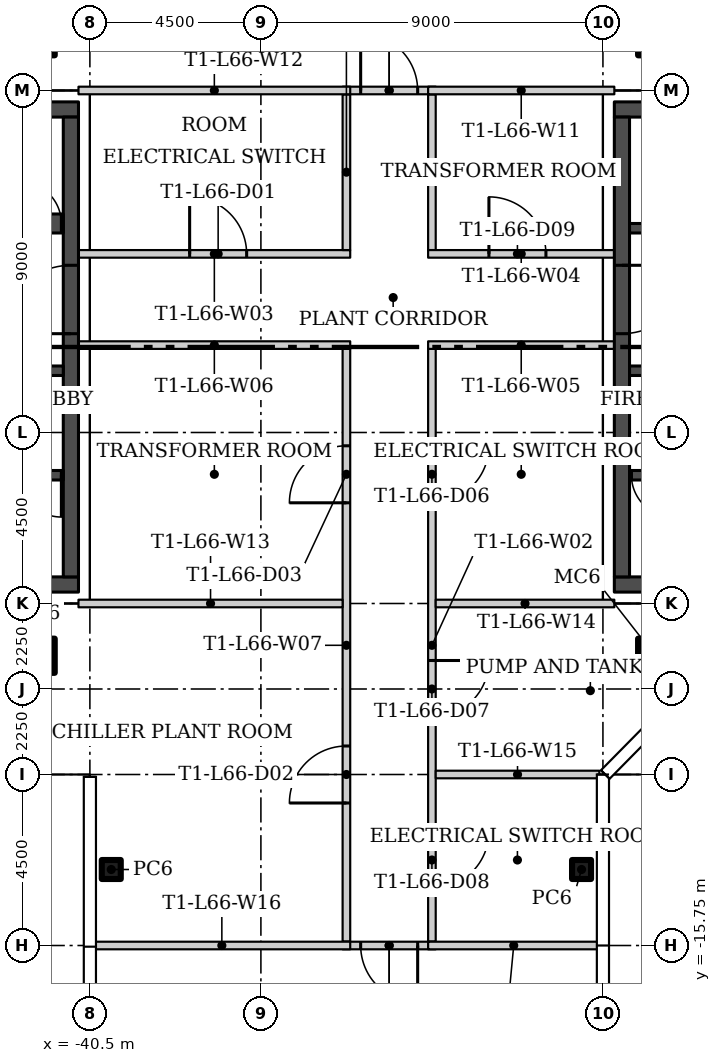
"""IFC4 building model, lengths in metres.
Left out: names, types, materials, properties, quantities, classifications, styles, units other than length and angle.
Written with IfcOpenShell. Run it as: python <this file> out.ifc"""

import sys

from ifc_helpers import new_model, si_unit, direction, frame, frame_2d, origin, origin_2d, place, context, subcontext, project, spatial, rectangle, hollow_rectangle, extrude, element, fill, save


model = new_model("IFC4")
c1 = context("Model", 3, precision=1e-05, world=origin(), true_north=direction((0.0, 1.0)))
c2 = subcontext(c1, "Body", "Model", "MODEL_VIEW")
j1 = project(units=[si_unit("LENGTHUNIT", "METRE"), si_unit("PLANEANGLEUNIT", "RADIAN")], contexts=[c1])
p1 = place(None, origin())
s1 = spatial("IfcSite", under=j1, at=p1, CompositionType="ELEMENT")
p2 = place(p1, origin())
s2 = spatial("IfcBuilding", under=s1, at=p2, CompositionType="ELEMENT")
p3 = place(p2, frame((0.0, 0.0, 273.3)))
s3 = spatial("IfcBuildingStorey", under=s2, at=p3, CompositionType="ELEMENT", Elevation=273.3)
for number, where in (
    (1, (-25.625, 8.125, 0.0)),
    (2, (-25.625, -8.125, 0.0)),
    (3, (-41.875, 8.125, 0.0)),
    (4, (-41.875, -8.125, 0.0)),
):
    element("IfcColumn", number, at=place(p3, frame(where)), inside=s3, PredefinedType="COLUMN", context=c2, shape_type="SweptSolid", body=[
        extrude(hollow_rectangle(XDim=0.9, YDim=0.9, WallThickness=0.036, at=origin_2d()), origin(), (0.0, 0.0, 1.0), 4.55),
    ])
for number, where in (
    (5, (-39.938, -13.75, 0.0)),
    (6, (-27.562, -13.75, 0.0)),
):
    element("IfcColumn", number, at=place(p3, frame(where)), inside=s3, PredefinedType="COLUMN", context=c2, shape_type="SweptSolid", body=[
        extrude(hollow_rectangle(XDim=0.5, YDim=0.5, WallThickness=0.016, at=origin_2d()), origin(), (0.0, 0.0, 1.0), 4.55),
    ])
p4 = place(p3, frame((-31.5, 6.65, 0.0), z_axis=(0.0, 0.0, 1.0), x_axis=(0.0, -1.0, 0.0)))
e7 = element("IfcWall", 7, at=p4, inside=s3, PredefinedType="PARTITIONING", context=c2, shape_type="SweptSolid", body=[
    extrude(rectangle(XDim=4.1, YDim=0.2, at=frame_2d((2.05, 0.0))), origin(), (0.0, 0.0, 1.0), 4.55),
])
p5 = place(p3, frame((-31.5, -0.05, 0.0), z_axis=(0.0, 0.0, 1.0), x_axis=(0.0, -1.0, 0.0)))
e8 = element("IfcWall", 8, at=p5, inside=s3, PredefinedType="PARTITIONING", context=c2, shape_type="SweptSolid", body=[
    extrude(rectangle(XDim=15.6, YDim=0.2, at=frame_2d((7.8, 0.0))), origin(), (0.0, 0.0, 1.0), 4.55),
])
p6 = place(p5, frame((2.55, 0.0, 0.0)))
e9 = element("IfcOpeningElement", 9, at=p6, cuts=e8, PredefinedType="OPENING", context=c2, shape_type="SweptSolid", body=[
    extrude(rectangle(XDim=1.5, YDim=2.4, at=frame_2d((0.75, 1.2))), frame((0.0, 0.11, 0.0), z_axis=(0.0, -1.0, 0.0), x_axis=(1.0, 0.0, 0.0)), (0.0, 0.0, 1.0), 0.22),
])
p7 = place(p5, frame((8.2, 0.0, 0.0)))
e10 = element("IfcOpeningElement", 10, at=p7, cuts=e8, PredefinedType="OPENING", context=c2, shape_type="SweptSolid", body=[
    extrude(rectangle(XDim=1.5, YDim=2.4, at=frame_2d((0.75, 1.2))), frame((0.0, 0.11, 0.0), z_axis=(0.0, -1.0, 0.0), x_axis=(1.0, 0.0, 0.0)), (0.0, 0.0, 1.0), 0.22),
])
p8 = place(p5, frame((12.7, 0.0, 0.0)))
e11 = element("IfcOpeningElement", 11, at=p8, cuts=e8, PredefinedType="OPENING", context=c2, shape_type="SweptSolid", body=[
    extrude(rectangle(XDim=1.5, YDim=2.4, at=frame_2d((0.75, 1.2))), frame((0.0, 0.11, 0.0), z_axis=(0.0, -1.0, 0.0), x_axis=(1.0, 0.0, 0.0)), (0.0, 0.0, 1.0), 0.22),
])
p9 = place(p3, frame((-40.8, 2.45, 0.0)))
e12 = element("IfcWall", 12, at=p9, inside=s3, PredefinedType="PARTITIONING", context=c2, shape_type="SweptSolid", body=[
    extrude(rectangle(XDim=7.15, YDim=0.2, at=frame_2d((3.575, 0.0))), origin(), (0.0, 0.0, 1.0), 4.55),
])
p10 = place(p9, frame((2.925, 0.0, 0.0)))
e13 = element("IfcOpeningElement", 13, at=p10, cuts=e12, PredefinedType="OPENING", context=c2, shape_type="SweptSolid", body=[
    extrude(rectangle(XDim=1.5, YDim=2.4, at=frame_2d((0.75, 1.2))), frame((0.0, 0.11, 0.0), z_axis=(0.0, -1.0, 0.0), x_axis=(1.0, 0.0, 0.0)), (0.0, 0.0, 1.0), 0.22),
])
p11 = place(p3, frame((-31.6, 2.45, 0.0)))
e14 = element("IfcWall", 14, at=p11, inside=s3, PredefinedType="PARTITIONING", context=c2, shape_type="SweptSolid", body=[
    extrude(rectangle(XDim=4.9, YDim=0.2, at=frame_2d((2.45, 0.0))), origin(), (0.0, 0.0, 1.0), 4.55),
])
p12 = place(p11, frame((1.6, 0.0, 0.0)))
e15 = element("IfcOpeningElement", 15, at=p12, cuts=e14, PredefinedType="OPENING", context=c2, shape_type="SweptSolid", body=[
    extrude(rectangle(XDim=1.5, YDim=2.4, at=frame_2d((0.75, 1.2))), frame((0.0, 0.11, 0.0), z_axis=(0.0, -1.0, 0.0), x_axis=(1.0, 0.0, 0.0)), (0.0, 0.0, 1.0), 0.22),
])
p13 = place(p3, frame((-26.7, 0.05, 0.0), z_axis=(0.0, 0.0, 1.0), x_axis=(-1.0, 0.0, 0.0)))
e16 = element("IfcWall", 16, at=p13, inside=s3, PredefinedType="PARTITIONING", context=c2, shape_type="SweptSolid", body=[
    extrude(rectangle(XDim=4.9, YDim=0.2, at=frame_2d((2.45, 0.0))), origin(), (0.0, 0.0, 1.0), 4.55),
])
p14 = place(p3, frame((-33.65, 0.05, 0.0), z_axis=(0.0, 0.0, 1.0), x_axis=(-1.0, 0.0, 0.0)))
e17 = element("IfcWall", 17, at=p14, inside=s3, PredefinedType="PARTITIONING", context=c2, shape_type="SweptSolid", body=[
    extrude(rectangle(XDim=7.15, YDim=0.2, at=frame_2d((3.575, 0.0))), origin(), (0.0, 0.0, 1.0), 4.55),
])
p15 = place(p3, frame((-33.75, -15.65, 0.0), z_axis=(0.0, 0.0, 1.0), x_axis=(0.0, 1.0, 0.0)))
e18 = element("IfcWall", 18, at=p15, inside=s3, PredefinedType="PARTITIONING", context=c2, shape_type="SweptSolid", body=[
    extrude(rectangle(XDim=15.6, YDim=0.2, at=frame_2d((7.8, 0.0))), origin(), (0.0, 0.0, 1.0), 4.55),
])
p16 = place(p15, frame((3.65, 0.0, 0.0)))
e19 = element("IfcOpeningElement", 19, at=p16, cuts=e18, PredefinedType="OPENING", context=c2, shape_type="SweptSolid", body=[
    extrude(rectangle(XDim=1.5, YDim=2.4, at=frame_2d((0.75, 1.2))), frame((0.0, 0.11, 0.0), z_axis=(0.0, -1.0, 0.0), x_axis=(1.0, 0.0, 0.0)), (0.0, 0.0, 1.0), 0.22),
])
p17 = place(p15, frame((11.55, 0.0, 0.0)))
e20 = element("IfcOpeningElement", 20, at=p17, cuts=e18, PredefinedType="OPENING", context=c2, shape_type="SweptSolid", body=[
    extrude(rectangle(XDim=1.5, YDim=2.4, at=frame_2d((0.75, 1.2))), frame((0.0, 0.11, 0.0), z_axis=(0.0, -1.0, 0.0), x_axis=(1.0, 0.0, 0.0)), (0.0, 0.0, 1.0), 0.22),
])
p18 = place(p3, frame((-33.75, 2.55, 0.0), z_axis=(0.0, 0.0, 1.0), x_axis=(0.0, 1.0, 0.0)))
e21 = element("IfcWall", 21, at=p18, inside=s3, PredefinedType="PARTITIONING", context=c2, shape_type="SweptSolid", body=[
    extrude(rectangle(XDim=4.1, YDim=0.2, at=frame_2d((2.05, 0.0))), origin(), (0.0, 0.0, 1.0), 4.55),
])
p19 = place(p3, frame((-33.85, 6.75, 0.0)))
e22 = element("IfcWall", 22, at=p19, inside=s3, PredefinedType="PARTITIONING", context=c2, shape_type="SweptSolid", body=[
    extrude(rectangle(XDim=2.45, YDim=0.2, at=frame_2d((1.225, 0.0))), origin(), (0.0, 0.0, 1.0), 4.55),
])
p20 = place(p19, frame((0.475, 0.0, 0.0)))
e23 = element("IfcOpeningElement", 23, at=p20, cuts=e22, PredefinedType="OPENING", context=c2, shape_type="SweptSolid", body=[
    extrude(rectangle(XDim=1.5, YDim=2.4, at=frame_2d((0.75, 1.2))), frame((0.0, 0.11, 0.0), z_axis=(0.0, -1.0, 0.0), x_axis=(1.0, 0.0, 0.0)), (0.0, 0.0, 1.0), 0.22),
])
p21 = place(p3, frame((-31.4, -15.75, 0.0), z_axis=(0.0, 0.0, 1.0), x_axis=(-1.0, 0.0, 0.0)))
e24 = element("IfcWall", 24, at=p21, inside=s3, PredefinedType="PARTITIONING", context=c2, shape_type="SweptSolid", body=[
    extrude(rectangle(XDim=2.45, YDim=0.2, at=frame_2d((1.225, 0.0))), origin(), (0.0, 0.0, 1.0), 4.55),
])
p22 = place(p21, frame((0.475, 0.0, 0.0)))
e25 = element("IfcOpeningElement", 25, at=p22, cuts=e24, PredefinedType="OPENING", context=c2, shape_type="SweptSolid", body=[
    extrude(rectangle(XDim=1.5, YDim=2.4, at=frame_2d((0.75, 1.2))), frame((0.0, 0.11, 0.0), z_axis=(0.0, -1.0, 0.0), x_axis=(1.0, 0.0, 0.0)), (0.0, 0.0, 1.0), 0.22),
])
p23 = place(p3, frame((-26.7, 6.75, 0.0), z_axis=(0.0, 0.0, 1.0), x_axis=(-1.0, 0.0, 0.0)))
e26 = element("IfcWall", 26, at=p23, inside=s3, PredefinedType="PARTITIONING", context=c2, shape_type="SweptSolid", body=[
    extrude(rectangle(XDim=4.9, YDim=0.2, at=frame_2d((2.45, 0.0))), origin(), (0.0, 0.0, 1.0), 4.55),
])
p24 = place(p3, frame((-33.65, 6.75, 0.0), z_axis=(0.0, 0.0, 1.0), x_axis=(-1.0, 0.0, 0.0)))
e27 = element("IfcWall", 27, at=p24, inside=s3, PredefinedType="PARTITIONING", context=c2, shape_type="SweptSolid", body=[
    extrude(rectangle(XDim=7.15, YDim=0.2, at=frame_2d((3.575, 0.0))), origin(), (0.0, 0.0, 1.0), 4.55),
])
p25 = place(p3, frame((-40.8, -6.75, 0.0)))
e28 = element("IfcWall", 28, at=p25, inside=s3, PredefinedType="PARTITIONING", context=c2, shape_type="SweptSolid", body=[
    extrude(rectangle(XDim=6.95, YDim=0.2, at=frame_2d((3.475, 0.0))), origin(), (0.0, 0.0, 1.0), 4.55),
])
p26 = place(p3, frame((-31.4, -6.75, 0.0)))
e29 = element("IfcWall", 29, at=p26, inside=s3, PredefinedType="PARTITIONING", context=c2, shape_type="SweptSolid", body=[
    extrude(rectangle(XDim=4.7, YDim=0.2, at=frame_2d((2.35, 0.0))), origin(), (0.0, 0.0, 1.0), 4.55),
])
p27 = place(p3, frame((-31.4, -11.25, 0.0)))
e30 = element("IfcWall", 30, at=p27, inside=s3, PredefinedType="PARTITIONING", context=c2, shape_type="SweptSolid", body=[
    extrude(rectangle(XDim=4.305, YDim=0.2, at=frame_2d((2.152, 0.0))), origin(), (0.0, 0.0, 1.0), 4.55),
])
p28 = place(p3, frame((-40.405, -15.75, 0.0)))
e31 = element("IfcWall", 31, at=p28, inside=s3, PredefinedType="PARTITIONING", context=c2, shape_type="SweptSolid", body=[
    extrude(rectangle(XDim=6.755, YDim=0.2, at=frame_2d((3.377, 0.0))), origin(), (0.0, 0.0, 1.0), 4.55),
])
p29 = place(p3, frame((-31.6, -15.75, 0.0)))
e32 = element("IfcWall", 32, at=p29, inside=s3, PredefinedType="PARTITIONING", context=c2, shape_type="SweptSolid", body=[
    extrude(rectangle(XDim=4.505, YDim=0.2, at=frame_2d((2.252, 0.0))), origin(), (0.0, 0.0, 1.0), 4.55),
])
for number, where in (
    (33, (-26.7, -6.25, 0.0)),
    (34, (-26.7, 6.25, 0.0)),
):
    element("IfcWall", number, at=place(p3, frame(where)), inside=s3, PredefinedType="SHEAR", context=c2, shape_type="SweptSolid", body=[
        extrude(rectangle(XDim=12.9, YDim=0.4, at=frame_2d((6.45, 0.0))), origin(), (0.0, 0.0, 1.0), 4.55),
    ])
p30 = place(p3, frame((-26.5, 6.05, 0.0), z_axis=(0.0, 0.0, 1.0), x_axis=(0.0, -1.0, 0.0)))
e35 = element("IfcWall", 35, at=p30, inside=s3, PredefinedType="SHEAR", context=c2, shape_type="SweptSolid", body=[
    extrude(rectangle(XDim=12.1, YDim=0.4, at=frame_2d((6.05, 0.0))), origin(), (0.0, 0.0, 1.0), 4.55),
])
p31 = place(p30, frame((3.9, 0.0, 0.0)))
e36 = element("IfcOpeningElement", 36, at=p31, cuts=e35, PredefinedType="OPENING", context=c2, shape_type="SweptSolid", body=[
    extrude(rectangle(XDim=1.8, YDim=2.4, at=frame_2d((0.9, 1.2))), frame((0.0, 0.21, 0.0), z_axis=(0.0, -1.0, 0.0), x_axis=(1.0, 0.0, 0.0)), (0.0, 0.0, 1.0), 0.42),
])
p32 = place(p3, frame((-14.2, -3.375, 0.0), z_axis=(0.0, 0.0, 1.0), x_axis=(-1.0, 0.0, 0.0)))
e37 = element("IfcWall", 37, at=p32, inside=s3, PredefinedType="SHEAR", context=c2, shape_type="SweptSolid", body=[
    extrude(rectangle(XDim=12.1, YDim=0.25, at=frame_2d((6.05, 0.0))), origin(), (0.0, 0.0, 1.0), 4.55),
])
p33 = place(p32, frame((10.95, 0.0, 0.0)))
e38 = element("IfcOpeningElement", 38, at=p33, cuts=e37, PredefinedType="OPENING", context=c2, shape_type="SweptSolid", body=[
    extrude(rectangle(XDim=1.1, YDim=2.1, at=frame_2d((0.55, 1.05))), frame((0.0, 0.135, 0.0), z_axis=(0.0, -1.0, 0.0), x_axis=(1.0, 0.0, 0.0)), (0.0, 0.0, 1.0), 0.27),
])
p34 = place(p3, frame((-14.2, -0.625, 0.0), z_axis=(0.0, 0.0, 1.0), x_axis=(-1.0, 0.0, 0.0)))
e39 = element("IfcWall", 39, at=p34, inside=s3, PredefinedType="SHEAR", context=c2, shape_type="SweptSolid", body=[
    extrude(rectangle(XDim=12.1, YDim=0.25, at=frame_2d((6.05, 0.0))), origin(), (0.0, 0.0, 1.0), 4.55),
])
p35 = place(p34, frame((8.65, 0.0, 0.0)))
e40 = element("IfcOpeningElement", 40, at=p35, cuts=e39, PredefinedType="OPENING", context=c2, shape_type="SweptSolid", body=[
    extrude(rectangle(XDim=1.2, YDim=2.1, at=frame_2d((0.6, 1.05))), frame((0.0, 0.135, 0.0), z_axis=(0.0, -1.0, 0.0), x_axis=(1.0, 0.0, 0.0)), (0.0, 0.0, 1.0), 0.27),
])
p36 = place(p34, frame((2.15, 0.0, 0.0)))
e41 = element("IfcOpeningElement", 41, at=p36, cuts=e39, PredefinedType="OPENING", context=c2, shape_type="SweptSolid", body=[
    extrude(rectangle(XDim=0.9, YDim=2.1, at=frame_2d((0.45, 1.05))), frame((0.0, 0.135, 0.0), z_axis=(0.0, -1.0, 0.0), x_axis=(1.0, 0.0, 0.0)), (0.0, 0.0, 1.0), 0.27),
])
p37 = place(p34, frame((0.525, 0.0, 0.0)))
e42 = element("IfcOpeningElement", 42, at=p37, cuts=e39, PredefinedType="OPENING", context=c2, shape_type="SweptSolid", body=[
    extrude(rectangle(XDim=0.9, YDim=2.1, at=frame_2d((0.45, 1.05))), frame((0.0, 0.135, 0.0), z_axis=(0.0, -1.0, 0.0), x_axis=(1.0, 0.0, 0.0)), (0.0, 0.0, 1.0), 0.27),
])
p38 = place(p3, frame((-26.3, 3.125, 0.0)))
e43 = element("IfcWall", 43, at=p38, inside=s3, PredefinedType="SHEAR", context=c2, shape_type="SweptSolid", body=[
    extrude(rectangle(XDim=12.1, YDim=0.25, at=frame_2d((6.05, 0.0))), origin(), (0.0, 0.0, 1.0), 4.55),
])
p39 = place(p38, frame((2.475, 0.0, 0.0)))
e44 = element("IfcOpeningElement", 44, at=p39, cuts=e43, PredefinedType="OPENING", context=c2, shape_type="SweptSolid", body=[
    extrude(rectangle(XDim=0.9, YDim=2.1, at=frame_2d((0.45, 1.05))), frame((0.0, 0.135, 0.0), z_axis=(0.0, -1.0, 0.0), x_axis=(1.0, 0.0, 0.0)), (0.0, 0.0, 1.0), 0.27),
])
for number, where, z_axis, x_axis in (
    (45, (-40.8, -6.25, 0.0), (0.0, 0.0, 1.0), (-1.0, 0.0, 0.0)),
    (46, (-40.8, 6.25, 0.0), (0.0, 0.0, 1.0), (-1.0, 0.0, 0.0)),
):
    element("IfcWall", number, at=place(p3, frame(where, z_axis=z_axis, x_axis=x_axis)), inside=s3, PredefinedType="SHEAR", context=c2, shape_type="SweptSolid", body=[
        extrude(rectangle(XDim=12.9, YDim=0.4, at=frame_2d((6.45, 0.0))), origin(), (0.0, 0.0, 1.0), 4.55),
    ])
p40 = place(p3, frame((-41.0, -6.05, 0.0), z_axis=(0.0, 0.0, 1.0), x_axis=(0.0, 1.0, 0.0)))
e47 = element("IfcWall", 47, at=p40, inside=s3, PredefinedType="SHEAR", context=c2, shape_type="SweptSolid", body=[
    extrude(rectangle(XDim=12.1, YDim=0.4, at=frame_2d((6.05, 0.0))), origin(), (0.0, 0.0, 1.0), 4.55),
])
p41 = place(p40, frame((6.4, 0.0, 0.0)))
e48 = element("IfcOpeningElement", 48, at=p41, cuts=e47, PredefinedType="OPENING", context=c2, shape_type="SweptSolid", body=[
    extrude(rectangle(XDim=1.8, YDim=2.4, at=frame_2d((0.9, 1.2))), frame((0.0, 0.21, 0.0), z_axis=(0.0, -1.0, 0.0), x_axis=(1.0, 0.0, 0.0)), (0.0, 0.0, 1.0), 0.42),
])
p42 = place(p3, frame((-41.2, -3.375, 0.0), z_axis=(0.0, 0.0, 1.0), x_axis=(-1.0, 0.0, 0.0)))
e49 = element("IfcWall", 49, at=p42, inside=s3, PredefinedType="SHEAR", context=c2, shape_type="SweptSolid", body=[
    extrude(rectangle(XDim=12.1, YDim=0.25, at=frame_2d((6.05, 0.0))), origin(), (0.0, 0.0, 1.0), 4.55),
])
p43 = place(p42, frame((0.05, 0.0, 0.0)))
e50 = element("IfcOpeningElement", 50, at=p43, cuts=e49, PredefinedType="OPENING", context=c2, shape_type="SweptSolid", body=[
    extrude(rectangle(XDim=1.1, YDim=2.1, at=frame_2d((0.55, 1.05))), frame((0.0, 0.135, 0.0), z_axis=(0.0, -1.0, 0.0), x_axis=(1.0, 0.0, 0.0)), (0.0, 0.0, 1.0), 0.27),
])
p44 = place(p3, frame((-41.2, -0.625, 0.0), z_axis=(0.0, 0.0, 1.0), x_axis=(-1.0, 0.0, 0.0)))
e51 = element("IfcWall", 51, at=p44, inside=s3, PredefinedType="SHEAR", context=c2, shape_type="SweptSolid", body=[
    extrude(rectangle(XDim=12.1, YDim=0.25, at=frame_2d((6.05, 0.0))), origin(), (0.0, 0.0, 1.0), 4.55),
])
p45 = place(p44, frame((2.25, 0.0, 0.0)))
e52 = element("IfcOpeningElement", 52, at=p45, cuts=e51, PredefinedType="OPENING", context=c2, shape_type="SweptSolid", body=[
    extrude(rectangle(XDim=1.2, YDim=2.1, at=frame_2d((0.6, 1.05))), frame((0.0, 0.135, 0.0), z_axis=(0.0, -1.0, 0.0), x_axis=(1.0, 0.0, 0.0)), (0.0, 0.0, 1.0), 0.27),
])
p46 = place(p44, frame((9.2, 0.0, 0.0)))
e53 = element("IfcOpeningElement", 53, at=p46, cuts=e51, PredefinedType="OPENING", context=c2, shape_type="SweptSolid", body=[
    extrude(rectangle(XDim=0.9, YDim=2.1, at=frame_2d((0.45, 1.05))), frame((0.0, 0.135, 0.0), z_axis=(0.0, -1.0, 0.0), x_axis=(1.0, 0.0, 0.0)), (0.0, 0.0, 1.0), 0.27),
])
p47 = place(p44, frame((10.825, 0.0, 0.0)))
e54 = element("IfcOpeningElement", 54, at=p47, cuts=e51, PredefinedType="OPENING", context=c2, shape_type="SweptSolid", body=[
    extrude(rectangle(XDim=0.9, YDim=2.1, at=frame_2d((0.45, 1.05))), frame((0.0, 0.135, 0.0), z_axis=(0.0, -1.0, 0.0), x_axis=(1.0, 0.0, 0.0)), (0.0, 0.0, 1.0), 0.27),
])
p48 = place(p3, frame((-48.5, 3.25, 0.0)))
e55 = element("IfcWall", 55, at=p48, inside=s3, PredefinedType="SHEAR", context=c2, shape_type="SweptSolid", body=[
    extrude(rectangle(XDim=7.3, YDim=0.5, at=frame_2d((3.65, 0.0))), origin(), (0.0, 0.0, 1.0), 4.55),
])
p49 = place(p48, frame((6.15, 0.0, 0.0)))
e56 = element("IfcOpeningElement", 56, at=p49, cuts=e55, PredefinedType="OPENING", context=c2, shape_type="SweptSolid", body=[
    extrude(rectangle(XDim=1.1, YDim=2.1, at=frame_2d((0.55, 1.05))), frame((0.0, 0.26, 0.0), z_axis=(0.0, -1.0, 0.0), x_axis=(1.0, 0.0, 0.0)), (0.0, 0.0, 1.0), 0.52),
])
p50 = place(p10, origin())
e57 = element("IfcDoor", 57, at=p50, inside=s3, OperationType="DOUBLE_DOOR_SINGLE_SWING", PredefinedType="DOOR", context=c2, shape_type="SweptSolid", body=[
    extrude(rectangle(XDim=1.5, YDim=2.4, at=frame_2d((0.75, 1.2))), frame((0.0, 0.025, 0.0), z_axis=(0.0, -1.0, 0.0), x_axis=(1.0, 0.0, 0.0)), (0.0, 0.0, 1.0), 0.05),
])
fill(e13, e57)
p51 = place(p16, origin())
e58 = element("IfcDoor", 58, at=p51, inside=s3, OperationType="DOUBLE_DOOR_SINGLE_SWING", PredefinedType="DOOR", context=c2, shape_type="SweptSolid", body=[
    extrude(rectangle(XDim=1.5, YDim=2.4, at=frame_2d((0.75, 1.2))), frame((0.0, 0.025, 0.0), z_axis=(0.0, -1.0, 0.0), x_axis=(1.0, 0.0, 0.0)), (0.0, 0.0, 1.0), 0.05),
])
fill(e19, e58)
p52 = place(p17, origin())
e59 = element("IfcDoor", 59, at=p52, inside=s3, OperationType="DOUBLE_DOOR_SINGLE_SWING", PredefinedType="DOOR", context=c2, shape_type="SweptSolid", body=[
    extrude(rectangle(XDim=1.5, YDim=2.4, at=frame_2d((0.75, 1.2))), frame((0.0, 0.025, 0.0), z_axis=(0.0, -1.0, 0.0), x_axis=(1.0, 0.0, 0.0)), (0.0, 0.0, 1.0), 0.05),
])
fill(e20, e59)
p53 = place(p20, origin())
e60 = element("IfcDoor", 60, at=p53, inside=s3, OperationType="DOUBLE_DOOR_SINGLE_SWING", PredefinedType="DOOR", context=c2, shape_type="SweptSolid", body=[
    extrude(rectangle(XDim=1.5, YDim=2.4, at=frame_2d((0.75, 1.2))), frame((0.0, 0.025, 0.0), z_axis=(0.0, -1.0, 0.0), x_axis=(1.0, 0.0, 0.0)), (0.0, 0.0, 1.0), 0.05),
])
fill(e23, e60)
p54 = place(p22, origin())
e61 = element("IfcDoor", 61, at=p54, inside=s3, OperationType="DOUBLE_DOOR_SINGLE_SWING", PredefinedType="DOOR", context=c2, shape_type="SweptSolid", body=[
    extrude(rectangle(XDim=1.5, YDim=2.4, at=frame_2d((0.75, 1.2))), frame((0.0, 0.025, 0.0), z_axis=(0.0, -1.0, 0.0), x_axis=(1.0, 0.0, 0.0)), (0.0, 0.0, 1.0), 0.05),
])
fill(e25, e61)
p55 = place(p6, origin())
e62 = element("IfcDoor", 62, at=p55, inside=s3, OperationType="DOUBLE_DOOR_SINGLE_SWING", PredefinedType="DOOR", context=c2, shape_type="SweptSolid", body=[
    extrude(rectangle(XDim=1.5, YDim=2.4, at=frame_2d((0.75, 1.2))), frame((0.0, 0.025, 0.0), z_axis=(0.0, -1.0, 0.0), x_axis=(1.0, 0.0, 0.0)), (0.0, 0.0, 1.0), 0.05),
])
fill(e9, e62)
p56 = place(p7, origin())
e63 = element("IfcDoor", 63, at=p56, inside=s3, OperationType="DOUBLE_DOOR_SINGLE_SWING", PredefinedType="DOOR", context=c2, shape_type="SweptSolid", body=[
    extrude(rectangle(XDim=1.5, YDim=2.4, at=frame_2d((0.75, 1.2))), frame((0.0, 0.025, 0.0), z_axis=(0.0, -1.0, 0.0), x_axis=(1.0, 0.0, 0.0)), (0.0, 0.0, 1.0), 0.05),
])
fill(e10, e63)
p57 = place(p8, origin())
e64 = element("IfcDoor", 64, at=p57, inside=s3, OperationType="DOUBLE_DOOR_SINGLE_SWING", PredefinedType="DOOR", context=c2, shape_type="SweptSolid", body=[
    extrude(rectangle(XDim=1.5, YDim=2.4, at=frame_2d((0.75, 1.2))), frame((0.0, 0.025, 0.0), z_axis=(0.0, -1.0, 0.0), x_axis=(1.0, 0.0, 0.0)), (0.0, 0.0, 1.0), 0.05),
])
fill(e11, e64)
p58 = place(p12, origin())
e65 = element("IfcDoor", 65, at=p58, inside=s3, OperationType="DOUBLE_DOOR_SINGLE_SWING", PredefinedType="DOOR", context=c2, shape_type="SweptSolid", body=[
    extrude(rectangle(XDim=1.5, YDim=2.4, at=frame_2d((0.75, 1.2))), frame((0.0, 0.025, 0.0), z_axis=(0.0, -1.0, 0.0), x_axis=(1.0, 0.0, 0.0)), (0.0, 0.0, 1.0), 0.05),
])
fill(e15, e65)
p59 = place(p31, origin())
e66 = element("IfcDoor", 66, at=p59, inside=s3, OperationType="DOUBLE_DOOR_SINGLE_SWING", PredefinedType="DOOR", context=c2, shape_type="SweptSolid", body=[
    extrude(rectangle(XDim=1.8, YDim=2.4, at=frame_2d((0.9, 1.2))), frame((0.0, 0.025, 0.0), z_axis=(0.0, -1.0, 0.0), x_axis=(1.0, 0.0, 0.0)), (0.0, 0.0, 1.0), 0.05),
])
fill(e36, e66)
p60 = place(p33, origin())
e67 = element("IfcDoor", 67, at=p60, inside=s3, OperationType="SINGLE_SWING_RIGHT", PredefinedType="DOOR", context=c2, shape_type="SweptSolid", body=[
    extrude(rectangle(XDim=1.1, YDim=2.1, at=frame_2d((0.55, 1.05))), frame((0.0, 0.025, 0.0), z_axis=(0.0, -1.0, 0.0), x_axis=(1.0, 0.0, 0.0)), (0.0, 0.0, 1.0), 0.05),
])
fill(e38, e67)
p61 = place(p41, origin())
e68 = element("IfcDoor", 68, at=p61, inside=s3, OperationType="DOUBLE_DOOR_SINGLE_SWING", PredefinedType="DOOR", context=c2, shape_type="SweptSolid", body=[
    extrude(rectangle(XDim=1.8, YDim=2.4, at=frame_2d((0.9, 1.2))), frame((0.0, 0.025, 0.0), z_axis=(0.0, -1.0, 0.0), x_axis=(1.0, 0.0, 0.0)), (0.0, 0.0, 1.0), 0.05),
])
fill(e48, e68)
p62 = place(p43, origin())
e69 = element("IfcDoor", 69, at=p62, inside=s3, OperationType="SINGLE_SWING_LEFT", PredefinedType="DOOR", context=c2, shape_type="SweptSolid", body=[
    extrude(rectangle(XDim=1.1, YDim=2.1, at=frame_2d((0.55, 1.05))), frame((0.0, 0.025, 0.0), z_axis=(0.0, -1.0, 0.0), x_axis=(1.0, 0.0, 0.0)), (0.0, 0.0, 1.0), 0.05),
])
fill(e50, e69)
p63 = place(p49, origin())
e70 = element("IfcDoor", 70, at=p63, inside=s3, OperationType="SINGLE_SWING_RIGHT", PredefinedType="DOOR", context=c2, shape_type="SweptSolid", body=[
    extrude(rectangle(XDim=1.1, YDim=2.1, at=frame_2d((0.55, 1.05))), frame((0.0, 0.025, 0.0), z_axis=(0.0, -1.0, 0.0), x_axis=(1.0, 0.0, 0.0)), (0.0, 0.0, 1.0), 0.05),
])
fill(e56, e70)
save(model, sys.argv[1])
